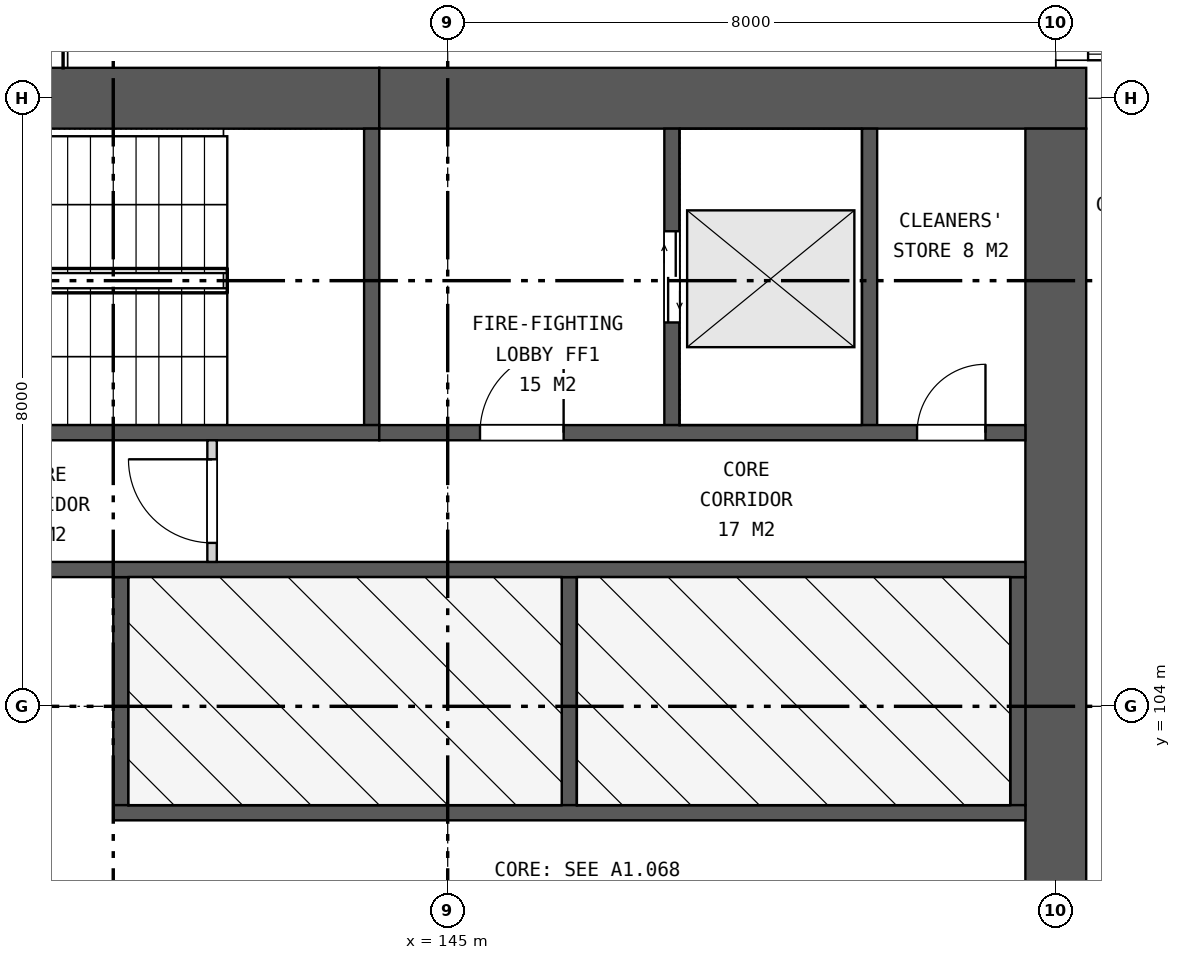
"""IFC4 building model, lengths in metres.
Left out: names, types, materials, properties, quantities, classifications, styles, units other than length and angle.
Written with IfcOpenShell. Run it as: python <this file> out.ifc"""

import sys

from ifc_helpers import new_model, si_unit, direction, frame, frame_2d, origin, place, context, subcontext, project, spatial, rectangle, extrude, element, fill, save


model = new_model("IFC4")
c1 = context("Model", 3, precision=1e-05, world=origin(), true_north=direction((0.0, 1.0)))
c2 = subcontext(c1, "Body", "Model", "MODEL_VIEW")
j1 = project(units=[si_unit("LENGTHUNIT", "METRE"), si_unit("PLANEANGLEUNIT", "RADIAN")], contexts=[c1])
p1 = place(None, origin())
s1 = spatial("IfcSite", under=j1, at=p1, CompositionType="ELEMENT")
p2 = place(p1, origin())
s2 = spatial("IfcBuilding", under=s1, at=p2, CompositionType="ELEMENT")
p3 = place(p2, frame((0.0, 0.0, 101.6)))
s3 = spatial("IfcBuildingStorey", under=s2, at=p3, CompositionType="ELEMENT", Elevation=101.6)
p4 = place(p3, frame((137.0, 112.0, 0.0), z_axis=(0.0, 0.0, 1.0), x_axis=(1.0, 0.0, 0.0)))
e1 = element("IfcWall", 1, at=p4, inside=s3, PredefinedType="SHEAR", context=c2, shape_type="SweptSolid", body=[
    extrude(rectangle(XDim=7.1, YDim=0.8, at=frame_2d((3.55, 0.0))), origin(), (0.0, 0.0, 1.0), 3.7),
])
p5 = place(p3, frame((144.1, 112.0, 0.0), z_axis=(0.0, 0.0, 1.0), x_axis=(1.0, 0.0, 0.0)))
e2 = element("IfcWall", 2, at=p5, inside=s3, PredefinedType="SHEAR", context=c2, shape_type="SweptSolid", body=[
    extrude(rectangle(XDim=9.3, YDim=0.8, at=frame_2d((4.65, 0.0))), origin(), (0.0, 0.0, 1.0), 3.7),
])
p6 = place(p3, frame((153.0, 88.4, 0.0), z_axis=(0.0, 0.0, 1.0), x_axis=(0.0, 1.0, 0.0)))
e3 = element("IfcWall", 3, at=p6, inside=s3, PredefinedType="SHEAR", context=c2, shape_type="SweptSolid", body=[
    extrude(rectangle(XDim=23.2, YDim=0.8, at=frame_2d((11.6, 0.0))), origin(), (0.0, 0.0, 1.0), 3.7),
])
p7 = place(p6, frame((10.4, 0.0, 0.0)))
e4 = element("IfcOpeningElement", 4, at=p7, cuts=e3, PredefinedType="OPENING", context=c2, shape_type="SweptSolid", body=[
    extrude(rectangle(XDim=2.4, YDim=2.4, at=frame_2d((1.2, 1.2))), frame((0.0, 0.41, 0.0), z_axis=(0.0, -1.0, 0.0), x_axis=(1.0, 0.0, 0.0)), (0.0, 0.0, 1.0), 0.82),
])
for number, where, z_axis, x_axis in (
    (5, (140.7, 102.7, 0.0), (0.0, 0.0, 1.0), (0.0, 1.0, 0.0)),
    (6, (146.6, 102.7, 0.0), (0.0, 0.0, 1.0), (0.0, 1.0, 0.0)),
    (7, (152.5, 102.7, 0.0), (0.0, 0.0, 1.0), (0.0, 1.0, 0.0)),
):
    element("IfcWall", number, at=place(p3, frame(where, z_axis=z_axis, x_axis=x_axis)), inside=s3, PredefinedType="SHEAR", context=c2, shape_type="SweptSolid", body=[
        extrude(rectangle(XDim=3.0, YDim=0.2, at=frame_2d((1.5, 0.0))), origin(), (0.0, 0.0, 1.0), 3.7),
    ])
p8 = place(p3, frame((140.6, 102.6, 0.0), z_axis=(0.0, 0.0, 1.0), x_axis=(1.0, 0.0, 0.0)))
e8 = element("IfcWall", 8, at=p8, inside=s3, PredefinedType="SHEAR", context=c2, shape_type="SweptSolid", body=[
    extrude(rectangle(XDim=12.0, YDim=0.2, at=frame_2d((6.0, 0.0))), origin(), (0.0, 0.0, 1.0), 3.7),
])
p9 = place(p3, frame((137.3, 105.8, 0.0), z_axis=(0.0, 0.0, 1.0), x_axis=(1.0, 0.0, 0.0)))
e9 = element("IfcWall", 9, at=p9, inside=s3, PredefinedType="SHEAR", context=c2, shape_type="SweptSolid", body=[
    extrude(rectangle(XDim=15.3, YDim=0.2, at=frame_2d((7.65, 0.0))), origin(), (0.0, 0.0, 1.0), 3.7),
])
p10 = place(p9, frame((0.95, 0.0, 0.0)))
e10 = element("IfcOpeningElement", 10, at=p10, cuts=e9, PredefinedType="OPENING", context=c2, shape_type="SweptSolid", body=[
    extrude(rectangle(XDim=1.1, YDim=2.1, at=frame_2d((0.55, 1.05))), frame((0.0, 0.11, 0.0), z_axis=(0.0, -1.0, 0.0), x_axis=(1.0, 0.0, 0.0)), (0.0, 0.0, 1.0), 0.22),
])
p11 = place(p3, frame((144.0, 107.7, 0.0), z_axis=(0.0, 0.0, 1.0), x_axis=(0.0, 1.0, 0.0)))
e11 = element("IfcWall", 11, at=p11, inside=s3, PredefinedType="SHEAR", context=c2, shape_type="SweptSolid", body=[
    extrude(rectangle(XDim=3.9, YDim=0.2, at=frame_2d((1.95, 0.0))), origin(), (0.0, 0.0, 1.0), 3.7),
])
p12 = place(p3, frame((147.95, 107.7, 0.0), z_axis=(0.0, 0.0, 1.0), x_axis=(0.0, 1.0, 0.0)))
e12 = element("IfcWall", 12, at=p12, inside=s3, PredefinedType="SHEAR", context=c2, shape_type="SweptSolid", body=[
    extrude(rectangle(XDim=3.9, YDim=0.2, at=frame_2d((1.95, 0.0))), origin(), (0.0, 0.0, 1.0), 3.7),
])
p13 = place(p12, frame((1.35, 0.0, 0.0)))
e13 = element("IfcOpeningElement", 13, at=p13, cuts=e12, PredefinedType="OPENING", context=c2, shape_type="SweptSolid", body=[
    extrude(rectangle(XDim=1.2, YDim=2.1, at=frame_2d((0.6, 1.05))), frame((0.0, 0.11, 0.0), z_axis=(0.0, -1.0, 0.0), x_axis=(1.0, 0.0, 0.0)), (0.0, 0.0, 1.0), 0.22),
])
p14 = place(p3, frame((150.55, 107.7, 0.0), z_axis=(0.0, 0.0, 1.0), x_axis=(0.0, 1.0, 0.0)))
e14 = element("IfcWall", 14, at=p14, inside=s3, PredefinedType="SHEAR", context=c2, shape_type="SweptSolid", body=[
    extrude(rectangle(XDim=3.9, YDim=0.2, at=frame_2d((1.95, 0.0))), origin(), (0.0, 0.0, 1.0), 3.7),
])
p15 = place(p3, frame((137.3, 107.6, 0.0), z_axis=(0.0, 0.0, 1.0), x_axis=(1.0, 0.0, 0.0)))
e15 = element("IfcWall", 15, at=p15, inside=s3, PredefinedType="SHEAR", context=c2, shape_type="SweptSolid", body=[
    extrude(rectangle(XDim=6.8, YDim=0.2, at=frame_2d((3.4, 0.0))), origin(), (0.0, 0.0, 1.0), 3.7),
])
p16 = place(p15, frame((0.15, 0.0, 0.0)))
e16 = element("IfcOpeningElement", 16, at=p16, cuts=e15, PredefinedType="OPENING", context=c2, shape_type="SweptSolid", body=[
    extrude(rectangle(XDim=1.0, YDim=2.1, at=frame_2d((0.5, 1.05))), frame((0.0, 0.11, 0.0), z_axis=(0.0, -1.0, 0.0), x_axis=(1.0, 0.0, 0.0)), (0.0, 0.0, 1.0), 0.22),
])
p17 = place(p3, frame((144.1, 107.6, 0.0), z_axis=(0.0, 0.0, 1.0), x_axis=(1.0, 0.0, 0.0)))
e17 = element("IfcWall", 17, at=p17, inside=s3, PredefinedType="SHEAR", context=c2, shape_type="SweptSolid", body=[
    extrude(rectangle(XDim=8.5, YDim=0.2, at=frame_2d((4.25, 0.0))), origin(), (0.0, 0.0, 1.0), 3.7),
])
p18 = place(p17, frame((1.325, 0.0, 0.0)))
e18 = element("IfcOpeningElement", 18, at=p18, cuts=e17, PredefinedType="OPENING", context=c2, shape_type="SweptSolid", body=[
    extrude(rectangle(XDim=1.1, YDim=2.1, at=frame_2d((0.55, 1.05))), frame((0.0, 0.11, 0.0), z_axis=(0.0, -1.0, 0.0), x_axis=(1.0, 0.0, 0.0)), (0.0, 0.0, 1.0), 0.22),
])
p19 = place(p17, frame((7.075, 0.0, 0.0)))
e19 = element("IfcOpeningElement", 19, at=p19, cuts=e17, PredefinedType="OPENING", context=c2, shape_type="SweptSolid", body=[
    extrude(rectangle(XDim=0.9, YDim=2.1, at=frame_2d((0.45, 1.05))), frame((0.0, 0.11, 0.0), z_axis=(0.0, -1.0, 0.0), x_axis=(1.0, 0.0, 0.0)), (0.0, 0.0, 1.0), 0.22),
])
p20 = place(p3, frame((141.9, 105.9, 0.0), z_axis=(0.0, 0.0, 1.0), x_axis=(0.0, 1.0, 0.0)))
e20 = element("IfcWall", 20, at=p20, inside=s3, PredefinedType="PARTITIONING", context=c2, shape_type="SweptSolid", body=[
    extrude(rectangle(XDim=1.6, YDim=0.125, at=frame_2d((0.8, 0.0))), origin(), (0.0, 0.0, 1.0), 3.7),
])
p21 = place(p20, frame((0.25, 0.0, 0.0)))
e21 = element("IfcOpeningElement", 21, at=p21, cuts=e20, PredefinedType="OPENING", context=c2, shape_type="SweptSolid", body=[
    extrude(rectangle(XDim=1.1, YDim=2.1, at=frame_2d((0.55, 1.05))), frame((0.0, 0.073, 0.0), z_axis=(0.0, -1.0, 0.0), x_axis=(1.0, 0.0, 0.0)), (0.0, 0.0, 1.0), 0.145),
])
p22 = place(p13, origin())
e22 = element("IfcDoor", 22, at=p22, inside=s3, OperationType="DOUBLE_DOOR_SLIDING", PredefinedType="DOOR", context=c2, shape_type="SweptSolid", body=[
    extrude(rectangle(XDim=1.2, YDim=2.1, at=frame_2d((0.6, 1.05))), frame((0.0, 0.025, 0.0), z_axis=(0.0, -1.0, 0.0), x_axis=(1.0, 0.0, 0.0)), (0.0, 0.0, 1.0), 0.05),
])
fill(e13, e22)
p23 = place(p18, origin())
e23 = element("IfcDoor", 23, at=p23, inside=s3, OperationType="SINGLE_SWING_RIGHT", PredefinedType="DOOR", context=c2, shape_type="SweptSolid", body=[
    extrude(rectangle(XDim=1.1, YDim=2.1, at=frame_2d((0.55, 1.05))), frame((0.0, 0.025, 0.0), z_axis=(0.0, -1.0, 0.0), x_axis=(1.0, 0.0, 0.0)), (0.0, 0.0, 1.0), 0.05),
])
fill(e18, e23)
p24 = place(p19, origin())
e24 = element("IfcDoor", 24, at=p24, inside=s3, OperationType="SINGLE_SWING_RIGHT", PredefinedType="DOOR", context=c2, shape_type="SweptSolid", body=[
    extrude(rectangle(XDim=0.9, YDim=2.1, at=frame_2d((0.45, 1.05))), frame((0.0, 0.025, 0.0), z_axis=(0.0, -1.0, 0.0), x_axis=(1.0, 0.0, 0.0)), (0.0, 0.0, 1.0), 0.05),
])
fill(e19, e24)
p25 = place(p21, origin())
e25 = element("IfcDoor", 25, at=p25, inside=s3, OperationType="SINGLE_SWING_RIGHT", PredefinedType="DOOR", context=c2, shape_type="SweptSolid", body=[
    extrude(rectangle(XDim=1.1, YDim=2.1, at=frame_2d((0.55, 1.05))), frame((0.0, 0.025, 0.0), z_axis=(0.0, -1.0, 0.0), x_axis=(1.0, 0.0, 0.0)), (0.0, 0.0, 1.0), 0.05),
])
fill(e21, e25)
save(model, sys.argv[1])
